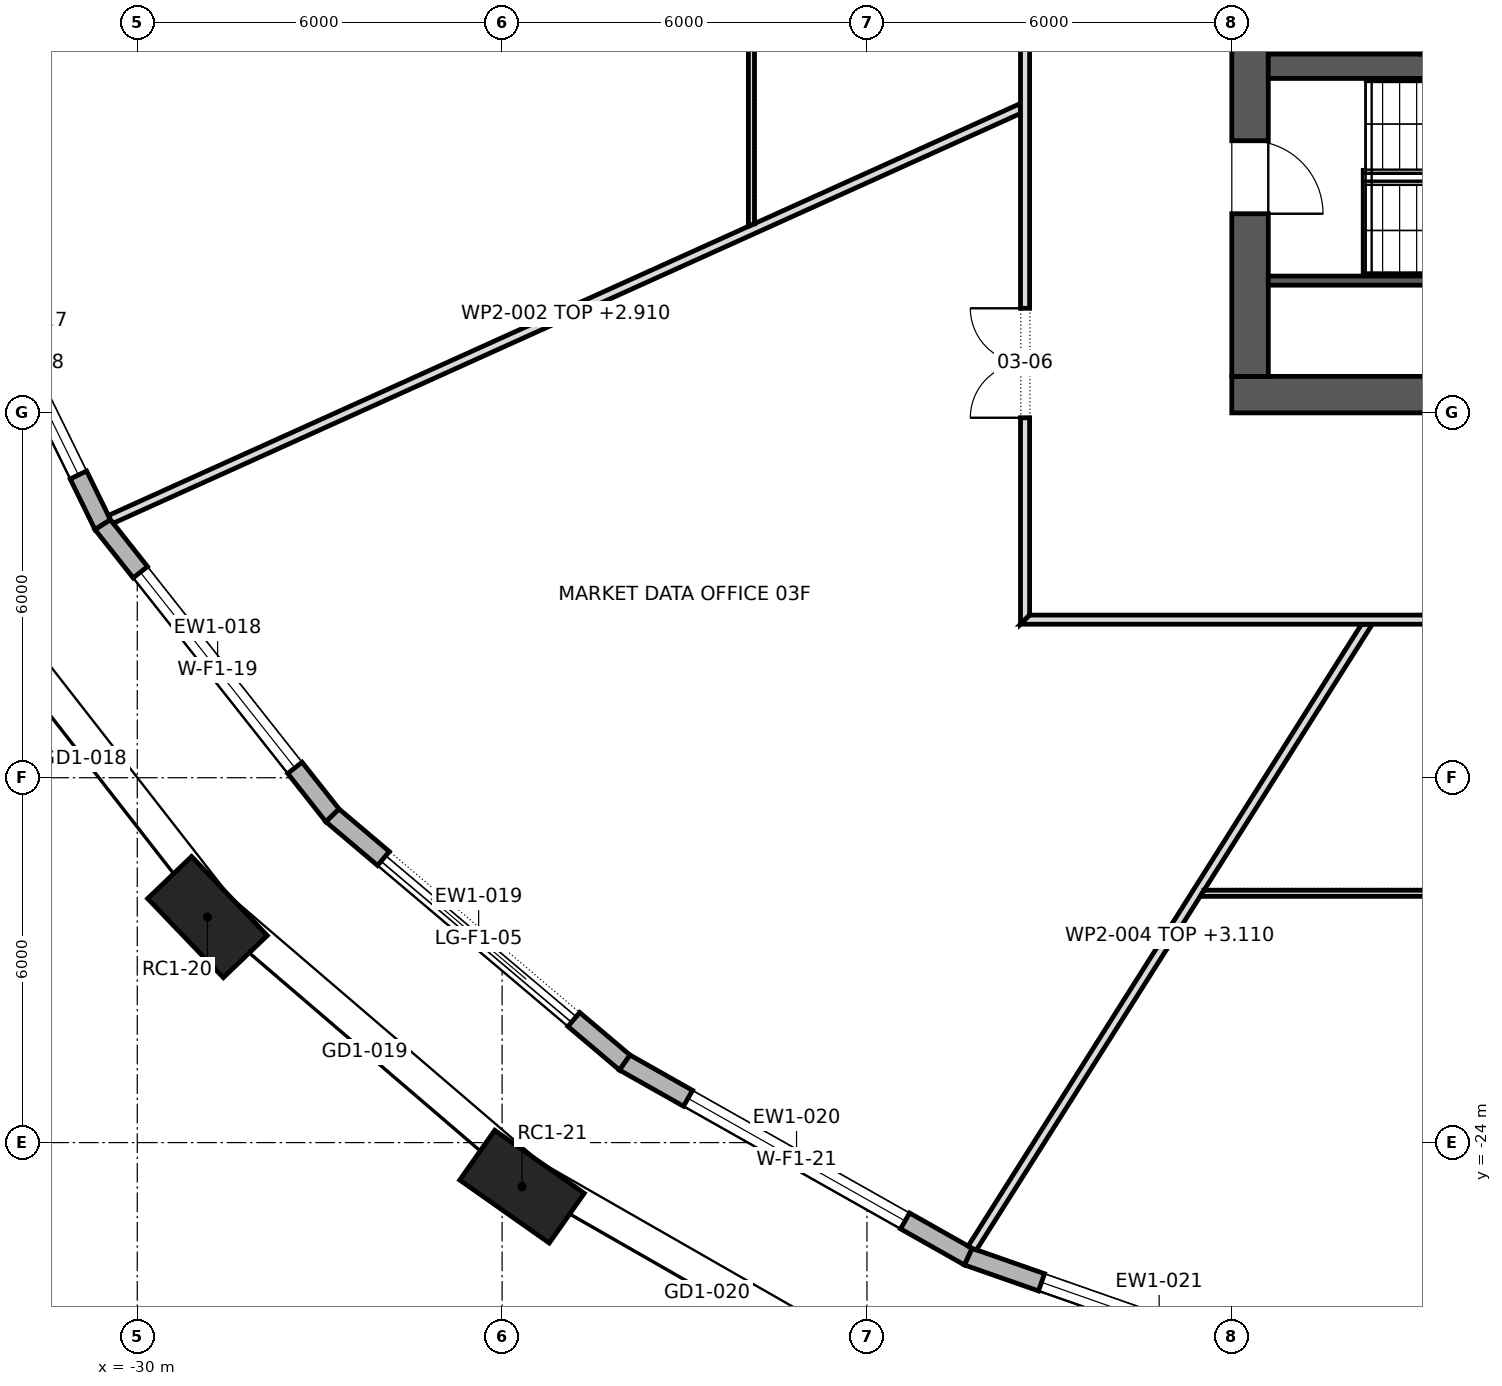
"""IFC4 building model, lengths in metres.
Left out: names, types, materials, properties, quantities, classifications, styles, units other than length and angle.
Written with IfcOpenShell. Run it as: python <this file> out.ifc"""

import sys

from ifc_helpers import new_model, si_unit, direction, frame, frame_2d, origin, origin_2d, place, context, subcontext, project, spatial, polyline, rectangle, outline, extrude, element, fill, save


model = new_model("IFC4")
c1 = context("Model", 3, precision=1e-05, world=origin(), true_north=direction((0.0, 1.0)))
c2 = subcontext(c1, "Body", "Model", "MODEL_VIEW")
j1 = project(units=[si_unit("LENGTHUNIT", "METRE"), si_unit("PLANEANGLEUNIT", "RADIAN")], contexts=[c1])
p1 = place(None, origin())
s1 = spatial("IfcSite", under=j1, at=p1, CompositionType="ELEMENT")
p2 = place(p1, origin())
s2 = spatial("IfcBuilding", under=s1, at=p2, CompositionType="ELEMENT")
p3 = place(p2, frame((0.0, 0.0, 48.7)))
s3 = spatial("IfcBuildingStorey", under=s2, at=p3, CompositionType="ELEMENT", Elevation=48.7)
for number, where, z_axis, x_axis in (
    (1, (-28.845, -20.291, 0.0), (0.0, 0.0, 1.0), (0.692, -0.722, 0.0)),
    (2, (-23.673, -24.725, 0.0), (0.0, 0.0, 1.0), (0.818, -0.575, 0.0)),
):
    element("IfcColumn", number, at=place(p3, frame(where, z_axis=z_axis, x_axis=x_axis)), inside=s3, PredefinedType="COLUMN", context=c2, shape_type="SweptSolid", body=[
        extrude(rectangle(XDim=1.8, YDim=1.0, at=origin_2d()), origin(), (0.0, 0.0, 1.0), 4.2),
    ])
p4 = place(p3, frame((-12.0, -11.7, 0.0), z_axis=(0.0, 0.0, 1.0), x_axis=(1.0, 0.0, 0.0)))
e3 = element("IfcWall", 3, at=p4, inside=s3, PredefinedType="SHEAR", context=c2, shape_type="SweptSolid", body=[
    extrude(rectangle(XDim=24.0, YDim=0.6, at=frame_2d((12.0, 0.0))), origin(), (0.0, 0.0, 1.0), 4.2),
])
p5 = place(p4, frame((9.975, 0.0, 0.0)))
e4 = element("IfcOpeningElement", 4, at=p5, cuts=e3, PredefinedType="OPENING", context=c2, shape_type="SweptSolid", body=[
    extrude(rectangle(XDim=0.9, YDim=2.1, at=frame_2d((0.45, 1.05))), frame((0.0, 0.312, 0.0), z_axis=(0.0, -1.0, 0.0), x_axis=(1.0, 0.0, 0.0)), (0.0, 0.0, 1.0), 0.624),
])
p6 = place(p4, frame((4.6, 0.0, 0.0)))
e5 = element("IfcOpeningElement", 5, at=p6, cuts=e3, PredefinedType="OPENING", context=c2, shape_type="SweptSolid", body=[
    extrude(rectangle(XDim=0.8, YDim=2.1, at=frame_2d((0.4, 1.05))), frame((0.0, 0.312, 0.0), z_axis=(0.0, -1.0, 0.0), x_axis=(1.0, 0.0, 0.0)), (0.0, 0.0, 1.0), 0.624),
])
p7 = place(p4, frame((7.0, 0.0, 0.0)))
e6 = element("IfcOpeningElement", 6, at=p7, cuts=e3, PredefinedType="OPENING", context=c2, shape_type="SweptSolid", body=[
    extrude(rectangle(XDim=0.8, YDim=2.1, at=frame_2d((0.4, 1.05))), frame((0.0, 0.312, 0.0), z_axis=(0.0, -1.0, 0.0), x_axis=(1.0, 0.0, 0.0)), (0.0, 0.0, 1.0), 0.624),
])
p8 = place(p4, frame((15.85, 0.0, 0.0)))
e7 = element("IfcOpeningElement", 7, at=p8, cuts=e3, PredefinedType="OPENING", context=c2, shape_type="SweptSolid", body=[
    extrude(rectangle(XDim=0.8, YDim=2.1, at=frame_2d((0.4, 1.05))), frame((0.0, 0.312, 0.0), z_axis=(0.0, -1.0, 0.0), x_axis=(1.0, 0.0, 0.0)), (0.0, 0.0, 1.0), 0.624),
])
p9 = place(p3, frame((-11.7, -11.4, 0.0), z_axis=(0.0, 0.0, 1.0), x_axis=(0.0, 1.0, 0.0)))
e8 = element("IfcWall", 8, at=p9, inside=s3, PredefinedType="SHEAR", context=c2, shape_type="SweptSolid", body=[
    extrude(rectangle(XDim=22.8, YDim=0.6, at=frame_2d((11.4, 0.0))), origin(), (0.0, 0.0, 1.0), 4.2),
])
p10 = place(p9, frame((10.2, 0.0, 0.0)))
e9 = element("IfcOpeningElement", 9, at=p10, cuts=e8, PredefinedType="OPENING", context=c2, shape_type="SweptSolid", body=[
    extrude(rectangle(XDim=2.4, YDim=2.1, at=frame_2d((1.2, 1.05))), frame((0.0, 0.312, 0.0), z_axis=(0.0, -1.0, 0.0), x_axis=(1.0, 0.0, 0.0)), (0.0, 0.0, 1.0), 0.624),
])
p11 = place(p9, frame((18.925, 0.0, 0.0)))
e10 = element("IfcOpeningElement", 10, at=p11, cuts=e8, PredefinedType="OPENING", context=c2, shape_type="SweptSolid", body=[
    extrude(rectangle(XDim=1.2, YDim=2.1, at=frame_2d((0.6, 1.05))), frame((0.0, 0.312, 0.0), z_axis=(0.0, -1.0, 0.0), x_axis=(1.0, 0.0, 0.0)), (0.0, 0.0, 1.0), 0.624),
])
p12 = place(p9, frame((2.675, 0.0, 0.0)))
e11 = element("IfcOpeningElement", 11, at=p12, cuts=e8, PredefinedType="OPENING", context=c2, shape_type="SweptSolid", body=[
    extrude(rectangle(XDim=1.2, YDim=2.1, at=frame_2d((0.6, 1.05))), frame((0.0, 0.312, 0.0), z_axis=(0.0, -1.0, 0.0), x_axis=(1.0, 0.0, 0.0)), (0.0, 0.0, 1.0), 0.624),
])
p13 = place(p3, frame((-11.4, -6.3, 0.0), z_axis=(0.0, 0.0, 1.0), x_axis=(1.0, 0.0, 0.0)))
e12 = element("IfcWall", 12, at=p13, inside=s3, PredefinedType="SHEAR", context=c2, shape_type="SweptSolid", body=[
    extrude(rectangle(XDim=22.8, YDim=0.4, at=frame_2d((11.4, 0.0))), origin(), (0.0, 0.0, 1.0), 4.2),
])
p14 = place(p13, frame((20.85, 0.0, 0.0)))
e13 = element("IfcOpeningElement", 13, at=p14, cuts=e12, PredefinedType="OPENING", context=c2, shape_type="SweptSolid", body=[
    extrude(rectangle(XDim=1.1, YDim=2.1, at=frame_2d((0.55, 1.05))), frame((0.0, 0.212, 0.0), z_axis=(0.0, -1.0, 0.0), x_axis=(1.0, 0.0, 0.0)), (0.0, 0.0, 1.0), 0.424),
])
p15 = place(p3, frame((-8.75, -6.1, 0.0), z_axis=(0.0, 0.0, 1.0), x_axis=(0.0, 1.0, 0.0)))
e14 = element("IfcWall", 14, at=p15, inside=s3, PredefinedType="SHEAR", context=c2, shape_type="SweptSolid", body=[
    extrude(rectangle(XDim=2.9, YDim=0.3, at=frame_2d((1.45, 0.0))), origin(), (0.0, 0.0, 1.0), 4.2),
])
p16 = place(p3, frame((-33.172, -8.523, 0.0), z_axis=(0.0, 0.0, 1.0), x_axis=(0.439906146647, -0.898043752911, 0.0)))
e15 = element("IfcWall", 15, at=p16, inside=s3, PredefinedType="STANDARD", context=c2, shape_type="SweptSolid", body=[
    extrude(outline(polyline([(-0.017, -0.15), (5.935, -0.15), (5.903, 0.15), (0.017, 0.15), (-0.017, -0.15)])), origin(), (0.0, 0.0, 1.0), 3.9),
])
p17 = place(p16, frame((0.909, 0.0, 0.6)))
e16 = element("IfcOpeningElement", 16, at=p17, cuts=e15, PredefinedType="OPENING", context=c2, shape_type="SweptSolid", body=[
    extrude(rectangle(XDim=4.1, YDim=2.85, at=frame_2d((2.05, 1.425))), frame((0.0, 0.162, 0.0), z_axis=(0.0, -1.0, 0.0), x_axis=(1.0, 0.0, 0.0)), (0.0, 0.0, 1.0), 0.324),
])
p18 = place(p3, frame((-30.568, -13.838, 0.0), z_axis=(0.0, 0.0, 1.0), x_axis=(0.619993638342, -0.78460683684, 0.0)))
e17 = element("IfcWall", 17, at=p18, inside=s3, PredefinedType="STANDARD", context=c2, shape_type="SweptSolid", body=[
    extrude(outline(polyline([(-0.016, -0.15), (6.109, -0.15), (6.079, 0.15), (0.016, 0.15), (-0.016, -0.15)])), origin(), (0.0, 0.0, 1.0), 3.9),
])
p19 = place(p18, frame((0.997, 0.0, 0.6)))
e18 = element("IfcOpeningElement", 18, at=p19, cuts=e17, PredefinedType="OPENING", context=c2, shape_type="SweptSolid", body=[
    extrude(rectangle(XDim=4.1, YDim=2.85, at=frame_2d((2.05, 1.425))), frame((0.0, 0.162, 0.0), z_axis=(0.0, -1.0, 0.0), x_axis=(1.0, 0.0, 0.0)), (0.0, 0.0, 1.0), 0.324),
])
p20 = place(p3, frame((-26.79, -18.62, 0.0), z_axis=(0.0, 0.0, 1.0), x_axis=(0.763614259808, -0.645672720671, 0.0)))
e19 = element("IfcWall", 19, at=p20, inside=s3, PredefinedType="STANDARD", context=c2, shape_type="SweptSolid", body=[
    extrude(outline(polyline([(-0.015, -0.15), (6.309, -0.15), (6.281, 0.15), (0.015, 0.15), (-0.015, -0.15)])), origin(), (0.0, 0.0, 1.0), 3.9),
])
p21 = place(p20, frame((1.097, 0.0, 0.0)))
e20 = element("IfcOpeningElement", 20, at=p21, cuts=e19, PredefinedType="OPENING", context=c2, shape_type="SweptSolid", body=[
    extrude(rectangle(XDim=4.1, YDim=3.45, at=frame_2d((2.05, 1.725))), frame((0.0, 0.162, 0.0), z_axis=(0.0, -1.0, 0.0), x_axis=(1.0, 0.0, 0.0)), (0.0, 0.0, 1.0), 0.324),
])
p22 = place(p3, frame((-21.983, -22.684, 0.0), z_axis=(0.0, 0.0, 1.0), x_axis=(0.870647609977, -0.491907246584, 0.0)))
e21 = element("IfcWall", 21, at=p22, inside=s3, PredefinedType="STANDARD", context=c2, shape_type="SweptSolid", body=[
    extrude(outline(polyline([(-0.014, -0.15), (6.503, -0.15), (6.476, 0.15), (0.014, 0.15), (-0.014, -0.15)])), origin(), (0.0, 0.0, 1.0), 3.9),
])
p23 = place(p22, frame((1.195, 0.0, 0.6)))
e22 = element("IfcOpeningElement", 22, at=p23, cuts=e21, PredefinedType="OPENING", context=c2, shape_type="SweptSolid", body=[
    extrude(rectangle(XDim=4.1, YDim=2.85, at=frame_2d((2.05, 1.425))), frame((0.0, 0.162, 0.0), z_axis=(0.0, -1.0, 0.0), x_axis=(1.0, 0.0, 0.0)), (0.0, 0.0, 1.0), 0.324),
])
p24 = place(p3, frame((-16.333, -25.876, 0.0), z_axis=(0.0, 0.0, 1.0), x_axis=(0.943790794479, -0.330543395421, 0.0)))
e23 = element("IfcWall", 23, at=p24, inside=s3, PredefinedType="STANDARD", context=c2, shape_type="SweptSolid", body=[
    extrude(outline(polyline([(-0.013, -0.15), (6.662, -0.15), (6.637, 0.15), (0.013, 0.15), (-0.013, -0.15)])), origin(), (0.0, 0.0, 1.0), 3.9),
])
p25 = place(p24, frame((1.275, 0.0, 0.6)))
e24 = element("IfcOpeningElement", 24, at=p25, cuts=e23, PredefinedType="OPENING", context=c2, shape_type="SweptSolid", body=[
    extrude(rectangle(XDim=4.1, YDim=2.85, at=frame_2d((2.05, 1.425))), frame((0.0, 0.162, 0.0), z_axis=(0.0, -1.0, 0.0), x_axis=(1.0, 0.0, 0.0)), (0.0, 0.0, 1.0), 0.324),
])
p26 = place(p3, frame((-11.4, -9.825, 0.0), z_axis=(0.0, 0.0, 1.0), x_axis=(1.0, 0.0, 0.0)))
e25 = element("IfcWall", 25, at=p26, inside=s3, PredefinedType="SHEAR", context=c2, shape_type="SweptSolid", body=[
    extrude(rectangle(XDim=8.0, YDim=0.15, at=frame_2d((4.0, 0.0))), origin(), (0.0, 0.0, 1.0), 3.9),
])
p27 = place(p3, frame((-30.444, -13.755, 0.0), z_axis=(0.0, 0.0, 1.0), x_axis=(0.911343853748, 0.411645940385, 0.0)))
e26 = element("IfcWall", 26, at=p27, inside=s3, PredefinedType="PARTITIONING", context=c2, shape_type="SweptSolid", body=[
    extrude(outline(polyline([(0.02, -0.075), (1.839, -0.075), (3.658, -0.075), (5.477, -0.075), (7.296, -0.075), (9.115, -0.075), (10.934, -0.075), (12.753, -0.075), (14.572, -0.075), (16.391, -0.075), (16.442, 0.038), (16.442, 0.038), (16.458, 0.075), (14.858, 0.075), (13.258, 0.075), (11.658, 0.075), (11.657, 0.073), (11.653, 0.075), (9.711, 0.075), (7.769, 0.075), (5.826, 0.075), (3.884, 0.075), (1.942, 0.075), (0.0, 0.075), (0.0, 0.062), (0.002, -0.004), (0.02, -0.075)])), origin(), (0.0, 0.0, 1.0), 2.91),
])
p28 = place(p3, frame((-19.9, -8.933, 0.0), z_axis=(0.0, 0.0, 1.0), x_axis=(0.0, 1.0, 0.0)))
e27 = element("IfcWall", 27, at=p28, inside=s3, PredefinedType="PARTITIONING", context=c2, shape_type="SweptSolid", body=[
    extrude(outline(polyline([(0.045, -0.05), (1.789, -0.05), (3.533, -0.05), (5.277, -0.05), (7.021, -0.05), (8.765, -0.05), (10.51, -0.05), (10.518, 0.046), (10.518, 0.05), (8.765, 0.05), (7.012, 0.05), (5.259, 0.05), (3.506, 0.05), (1.753, 0.05), (0.0, 0.05), (0.0, 0.05), (0.045, -0.05)])), origin(), (0.0, 0.0, 1.0), 3.9),
])
p29 = place(p28, frame((4.817, 0.0, 0.0)))
e28 = element("IfcOpeningElement", 28, at=p29, cuts=e27, PredefinedType="OPENING", context=c2, shape_type="SweptSolid", body=[
    extrude(rectangle(XDim=0.9, YDim=2.1, at=frame_2d((0.45, 1.05))), frame((0.0, 0.062, 0.0), z_axis=(0.0, -1.0, 0.0), x_axis=(1.0, 0.0, 0.0)), (0.0, 0.0, 1.0), 0.124),
])
p30 = place(p3, frame((-16.273, -25.742, 0.0), z_axis=(0.0, 0.0, 1.0), x_axis=(0.534654841392, 0.845070529942, 0.0)))
e29 = element("IfcWall", 29, at=p30, inside=s3, PredefinedType="PARTITIONING", context=c2, shape_type="SweptSolid", body=[
    extrude(outline(polyline([(0.021, -0.075), (1.769, -0.075), (3.517, -0.075), (5.265, -0.075), (7.013, -0.075), (7.018, -0.072), (7.019, -0.075), (8.745, -0.075), (10.471, -0.075), (12.196, -0.075), (12.196, -0.075), (12.102, 0.075), (10.373, 0.075), (8.644, 0.075), (6.915, 0.075), (5.186, 0.075), (3.458, 0.075), (1.729, 0.075), (0.0, 0.075), (0.0, 0.071), (0.004, -0.0), (0.021, -0.075)])), origin(), (0.0, 0.0, 1.0), 3.11),
])
p31 = place(p3, frame((-15.4, -15.475, 0.0), z_axis=(0.0, 0.0, 1.0), x_axis=(0.0, 1.0, 0.0)))
e30 = element("IfcWall", 30, at=p31, inside=s3, PredefinedType="PARTITIONING", context=c2, shape_type="SweptSolid", body=[
    extrude(outline(polyline([(0.15, -0.075), (2.066, -0.075), (3.981, -0.075), (5.897, -0.075), (7.812, -0.075), (9.728, -0.075), (11.644, -0.075), (13.56, -0.075), (15.475, -0.075), (17.391, -0.075), (19.306, -0.075), (21.222, -0.075), (23.138, -0.075), (25.053, -0.075), (26.969, -0.075), (28.885, -0.075), (30.8, -0.075), (30.95, 0.075), (29.016, 0.075), (27.081, 0.075), (25.147, 0.075), (23.212, 0.075), (21.278, 0.075), (19.344, 0.075), (17.409, 0.075), (15.475, 0.075), (13.541, 0.075), (11.606, 0.075), (9.672, 0.075), (7.738, 0.075), (5.803, 0.075), (3.869, 0.075), (1.935, 0.075), (0.0, 0.075), (0.15, -0.075)])), origin(), (0.0, 0.0, 1.0), 3.9),
])
p32 = place(p31, frame((25.755, 0.0, 0.0)))
e31 = element("IfcOpeningElement", 31, at=p32, cuts=e30, PredefinedType="OPENING", context=c2, shape_type="SweptSolid", body=[
    extrude(rectangle(XDim=1.8, YDim=2.1, at=frame_2d((0.9, 1.05))), frame((0.0, 0.087, 0.0), z_axis=(0.0, -1.0, 0.0), x_axis=(1.0, 0.0, 0.0)), (0.0, 0.0, 1.0), 0.174),
])
p33 = place(p31, frame((18.695, 0.0, 0.0)))
e32 = element("IfcOpeningElement", 32, at=p33, cuts=e30, PredefinedType="OPENING", context=c2, shape_type="SweptSolid", body=[
    extrude(rectangle(XDim=1.8, YDim=2.1, at=frame_2d((0.9, 1.05))), frame((0.0, 0.087, 0.0), z_axis=(0.0, -1.0, 0.0), x_axis=(1.0, 0.0, 0.0)), (0.0, 0.0, 1.0), 0.174),
])
p34 = place(p31, frame((12.135, 0.0, 0.0)))
e33 = element("IfcOpeningElement", 33, at=p34, cuts=e30, PredefinedType="OPENING", context=c2, shape_type="SweptSolid", body=[
    extrude(rectangle(XDim=1.0, YDim=2.1, at=frame_2d((0.5, 1.05))), frame((0.0, 0.087, 0.0), z_axis=(0.0, -1.0, 0.0), x_axis=(1.0, 0.0, 0.0)), (0.0, 0.0, 1.0), 0.174),
])
p35 = place(p31, frame((3.395, 0.0, 0.0)))
e34 = element("IfcOpeningElement", 34, at=p35, cuts=e30, PredefinedType="OPENING", context=c2, shape_type="SweptSolid", body=[
    extrude(rectangle(XDim=1.8, YDim=2.1, at=frame_2d((0.9, 1.05))), frame((0.0, 0.087, 0.0), z_axis=(0.0, -1.0, 0.0), x_axis=(1.0, 0.0, 0.0)), (0.0, 0.0, 1.0), 0.174),
])
p36 = place(p3, frame((-15.475, -15.4, 0.0), z_axis=(0.0, 0.0, 1.0), x_axis=(1.0, 0.0, 0.0)))
e35 = element("IfcWall", 35, at=p36, inside=s3, PredefinedType="PARTITIONING", context=c2, shape_type="SweptSolid", body=[
    extrude(outline(polyline([(0.0, -0.075), (1.935, -0.075), (3.869, -0.075), (5.803, -0.075), (7.738, -0.075), (9.672, -0.075), (11.606, -0.075), (13.541, -0.075), (15.475, -0.075), (17.409, -0.075), (19.344, -0.075), (21.278, -0.075), (23.212, -0.075), (25.147, -0.075), (27.081, -0.075), (29.016, -0.075), (30.95, -0.075), (30.8, 0.075), (28.885, 0.075), (26.969, 0.075), (25.053, 0.075), (23.138, 0.075), (21.222, 0.075), (19.306, 0.075), (17.391, 0.075), (15.475, 0.075), (13.56, 0.075), (11.644, 0.075), (9.728, 0.075), (7.812, 0.075), (5.897, 0.075), (3.981, 0.075), (2.066, 0.075), (0.15, 0.075), (0.0, -0.075)])), origin(), (0.0, 0.0, 1.0), 3.9),
])
p37 = place(p36, frame((10.445, 0.0, 0.0)))
e36 = element("IfcOpeningElement", 36, at=p37, cuts=e35, PredefinedType="OPENING", context=c2, shape_type="SweptSolid", body=[
    extrude(rectangle(XDim=1.0, YDim=2.1, at=frame_2d((0.5, 1.05))), frame((0.0, 0.087, 0.0), z_axis=(0.0, -1.0, 0.0), x_axis=(1.0, 0.0, 0.0)), (0.0, 0.0, 1.0), 0.174),
])
p38 = place(p36, frame((18.07, 0.0, 0.0)))
e37 = element("IfcOpeningElement", 37, at=p38, cuts=e35, PredefinedType="OPENING", context=c2, shape_type="SweptSolid", body=[
    extrude(rectangle(XDim=1.0, YDim=2.1, at=frame_2d((0.5, 1.05))), frame((0.0, 0.087, 0.0), z_axis=(0.0, -1.0, 0.0), x_axis=(1.0, 0.0, 0.0)), (0.0, 0.0, 1.0), 0.174),
])
p39 = place(p36, frame((25.035, 0.0, 0.0)))
e38 = element("IfcOpeningElement", 38, at=p39, cuts=e35, PredefinedType="OPENING", context=c2, shape_type="SweptSolid", body=[
    extrude(rectangle(XDim=1.8, YDim=2.1, at=frame_2d((0.9, 1.05))), frame((0.0, 0.087, 0.0), z_axis=(0.0, -1.0, 0.0), x_axis=(1.0, 0.0, 0.0)), (0.0, 0.0, 1.0), 0.174),
])
p40 = place(p3, frame((-12.52, -19.9, 0.0), z_axis=(0.0, 0.0, 1.0), x_axis=(1.0, 0.0, 0.0)))
e39 = element("IfcWall", 39, at=p40, inside=s3, PredefinedType="PARTITIONING", context=c2, shape_type="SweptSolid", body=[
    extrude(outline(polyline([(19.594, -0.05), (19.594, -0.049), (19.558, 0.05), (17.978, 0.05), (16.399, 0.05), (14.819, 0.05), (13.24, 0.05), (13.24, 0.05), (13.14, 0.05), (13.14, 0.05), (11.271, 0.05), (9.403, 0.05), (7.535, 0.05), (5.667, 0.05), (3.799, 0.05), (1.931, 0.05), (0.063, 0.05), (0.0, -0.05), (0.0, -0.05), (1.959, -0.05), (3.919, -0.05), (5.878, -0.05), (7.837, -0.05), (9.797, -0.05), (11.756, -0.05), (13.715, -0.05), (15.675, -0.05), (17.634, -0.05), (19.594, -0.05)])), origin(), (0.0, 0.0, 1.0), 3.9),
])
p41 = place(p40, frame((6.115, 0.0, 0.0)))
e40 = element("IfcOpeningElement", 40, at=p41, cuts=e39, PredefinedType="OPENING", context=c2, shape_type="SweptSolid", body=[
    extrude(rectangle(XDim=0.9, YDim=2.1, at=frame_2d((0.45, 1.05))), frame((0.0, 0.062, 0.0), z_axis=(0.0, -1.0, 0.0), x_axis=(1.0, 0.0, 0.0)), (0.0, 0.0, 1.0), 0.124),
])
p42 = place(p17, origin())
e41 = element("IfcWindow", 41, at=p42, inside=s3, PartitioningType="TRIPLE_PANEL_VERTICAL", PredefinedType="WINDOW", context=c2, shape_type="SweptSolid", body=[
    extrude(rectangle(XDim=4.1, YDim=2.85, at=frame_2d((2.05, 1.425))), frame((0.0, 0.03, 0.0), z_axis=(0.0, -1.0, 0.0), x_axis=(1.0, 0.0, 0.0)), (0.0, 0.0, 1.0), 0.06),
])
fill(e16, e41)
p43 = place(p19, origin())
e42 = element("IfcWindow", 42, at=p43, inside=s3, PartitioningType="TRIPLE_PANEL_VERTICAL", PredefinedType="WINDOW", context=c2, shape_type="SweptSolid", body=[
    extrude(rectangle(XDim=4.1, YDim=2.85, at=frame_2d((2.05, 1.425))), frame((0.0, 0.03, 0.0), z_axis=(0.0, -1.0, 0.0), x_axis=(1.0, 0.0, 0.0)), (0.0, 0.0, 1.0), 0.06),
])
fill(e18, e42)
p44 = place(p21, origin())
e43 = element("IfcDoor", 43, at=p44, inside=s3, OperationType="DOUBLE_DOOR_SLIDING", PredefinedType="DOOR", context=c2, shape_type="SweptSolid", body=[
    extrude(rectangle(XDim=4.1, YDim=3.45, at=frame_2d((2.05, 1.725))), frame((0.0, 0.025, 0.0), z_axis=(0.0, -1.0, 0.0), x_axis=(1.0, 0.0, 0.0)), (0.0, 0.0, 1.0), 0.05),
])
fill(e20, e43)
p45 = place(p23, origin())
e44 = element("IfcWindow", 44, at=p45, inside=s3, PartitioningType="TRIPLE_PANEL_VERTICAL", PredefinedType="WINDOW", context=c2, shape_type="SweptSolid", body=[
    extrude(rectangle(XDim=4.1, YDim=2.85, at=frame_2d((2.05, 1.425))), frame((0.0, 0.03, 0.0), z_axis=(0.0, -1.0, 0.0), x_axis=(1.0, 0.0, 0.0)), (0.0, 0.0, 1.0), 0.06),
])
fill(e22, e44)
p46 = place(p25, origin())
e45 = element("IfcWindow", 45, at=p46, inside=s3, PartitioningType="TRIPLE_PANEL_VERTICAL", PredefinedType="WINDOW", context=c2, shape_type="SweptSolid", body=[
    extrude(rectangle(XDim=4.1, YDim=2.85, at=frame_2d((2.05, 1.425))), frame((0.0, 0.03, 0.0), z_axis=(0.0, -1.0, 0.0), x_axis=(1.0, 0.0, 0.0)), (0.0, 0.0, 1.0), 0.06),
])
fill(e24, e45)
p47 = place(p12, frame((1.2, 0.0, 0.0), z_axis=(0.0, 0.0, 1.0), x_axis=(-1.0, 0.0, 0.0)))
e46 = element("IfcDoor", 46, at=p47, inside=s3, OperationType="SINGLE_SWING_LEFT", PredefinedType="DOOR", context=c2, shape_type="SweptSolid", body=[
    extrude(rectangle(XDim=1.2, YDim=2.1, at=frame_2d((0.6, 1.05))), frame((0.0, 0.025, 0.0), z_axis=(0.0, -1.0, 0.0), x_axis=(1.0, 0.0, 0.0)), (0.0, 0.0, 1.0), 0.05),
])
fill(e11, e46)
p48 = place(p35, origin())
e47 = element("IfcDoor", 47, at=p48, inside=s3, OperationType="DOUBLE_DOOR_SINGLE_SWING", PredefinedType="DOOR", context=c2, shape_type="SweptSolid", body=[
    extrude(rectangle(XDim=1.8, YDim=2.1, at=frame_2d((0.9, 1.05))), frame((0.0, 0.025, 0.0), z_axis=(0.0, -1.0, 0.0), x_axis=(1.0, 0.0, 0.0)), (0.0, 0.0, 1.0), 0.05),
])
fill(e34, e47)
save(model, sys.argv[1])
